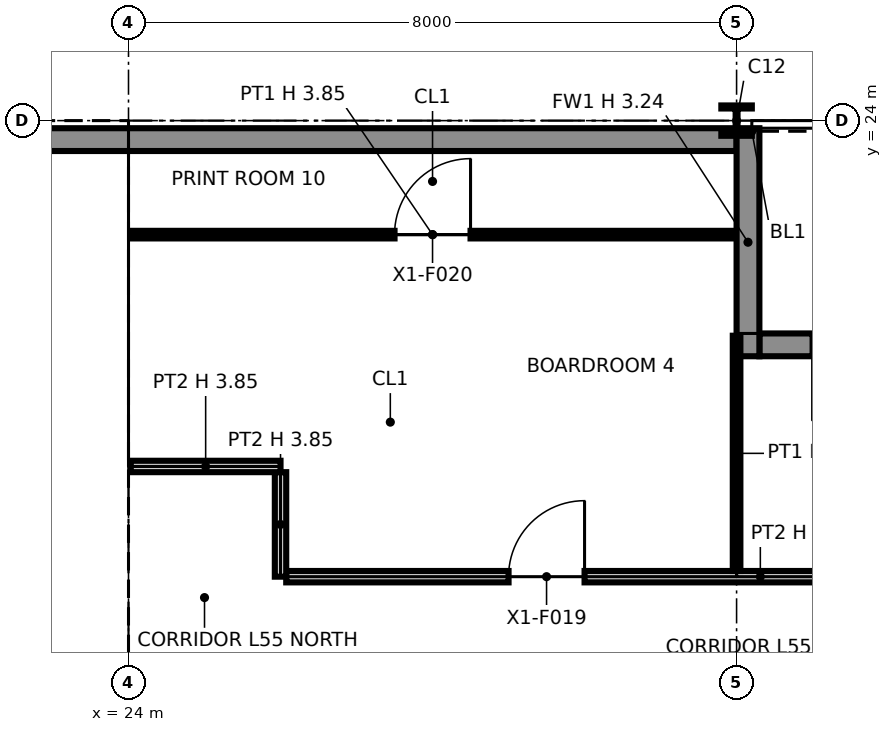
"""IFC4 building model, lengths in metres.
Left out: names, types, materials, properties, quantities, classifications, styles, units other than length and angle.
Written with IfcOpenShell. Run it as: python <this file> out.ifc"""

import sys

from ifc_helpers import new_model, si_unit, direction, frame, frame_2d, origin, origin_2d, place, context, subcontext, project, spatial, polyline, rectangle, i_section, outline, extrude, element, fill, save


model = new_model("IFC4")
c1 = context("Model", 3, precision=1e-05, world=origin(), true_north=direction((0.0, 1.0)))
c2 = subcontext(c1, "Body", "Model", "MODEL_VIEW")
j1 = project(units=[si_unit("LENGTHUNIT", "METRE"), si_unit("PLANEANGLEUNIT", "RADIAN")], contexts=[c1])
p1 = place(None, origin())
s1 = spatial("IfcSite", under=j1, at=p1, CompositionType="ELEMENT")
p2 = place(p1, origin())
s2 = spatial("IfcBuilding", under=s1, at=p2, CompositionType="ELEMENT")
p3 = place(p2, frame((0.0, 0.0, 255.0)))
s3 = spatial("IfcBuildingStorey", under=s2, at=p3, CompositionType="ELEMENT", Elevation=255.0)
for number, where, z_axis, x_axis in (
    (1, (24.0, 24.0, 0.0), (0.0, 0.0, 1.0), (1.0, 0.0, 0.0)),
    (2, (32.0, 24.0, 0.0), (0.0, 0.0, 1.0), (1.0, 0.0, 0.0)),
):
    element("IfcColumn", number, at=place(p3, frame(where, z_axis=z_axis, x_axis=x_axis)), inside=s3, PredefinedType="COLUMN", context=c2, shape_type="SweptSolid", body=[
        extrude(i_section(OverallWidth=0.401, OverallDepth=0.399, WebThickness=0.025, FlangeThickness=0.04, at=origin_2d()), origin(), (0.0, 0.0, 1.0), 3.85),
    ])
p4 = place(p3, frame((39.7, 21.05, 0.0), z_axis=(0.0, 0.0, 1.0), x_axis=(-1.0, 0.0, 0.0)))
e3 = element("IfcWall", 3, at=p4, inside=s3, PredefinedType="SOLIDWALL", context=c2, shape_type="SweptSolid", body=[
    extrude(rectangle(XDim=7.4, YDim=0.3, at=frame_2d((3.7, 0.0))), origin(), (0.0, 0.0, 1.0), 3.85),
])
p5 = place(p4, frame((0.3, 0.0, 0.9)))
e4 = element("IfcOpeningElement", 4, at=p5, cuts=e3, PredefinedType="OPENING", context=c2, shape_type="SweptSolid", body=[
    extrude(rectangle(XDim=2.8, YDim=2.2, at=frame_2d((1.4, 1.1))), frame((0.0, 0.16, 0.0), z_axis=(0.0, -1.0, 0.0), x_axis=(1.0, 0.0, 0.0)), (0.0, 0.0, 1.0), 0.32),
])
p6 = place(p4, frame((4.7, 0.0, 0.0)))
e5 = element("IfcOpeningElement", 5, at=p6, cuts=e3, PredefinedType="OPENING", context=c2, shape_type="SweptSolid", body=[
    extrude(rectangle(XDim=2.0, YDim=2.4, at=frame_2d((1.0, 1.2))), frame((0.0, 0.16, 0.0), z_axis=(0.0, -1.0, 0.0), x_axis=(1.0, 0.0, 0.0)), (0.0, 0.0, 1.0), 0.32),
])
p7 = place(p3, frame((32.15, 23.9, 0.0), z_axis=(0.0, 0.0, 1.0), x_axis=(0.0, -1.0, 0.0)))
e6 = element("IfcWall", 6, at=p7, inside=s3, PredefinedType="SOLIDWALL", context=c2, shape_type="SweptSolid", body=[
    extrude(rectangle(XDim=3.0, YDim=0.3, at=frame_2d((1.5, 0.0))), origin(), (0.0, 0.0, 1.0), 3.237),
])
p8 = place(p3, frame((32.0, 23.75, 0.0), z_axis=(0.0, 0.0, 1.0), x_axis=(-1.0, 0.0, 0.0)))
e7 = element("IfcWall", 7, at=p8, inside=s3, PredefinedType="SOLIDWALL", context=c2, shape_type="SweptSolid", body=[
    extrude(rectangle(XDim=25.9, YDim=0.3, at=frame_2d((12.95, 0.0))), origin(), (0.0, 0.0, 1.0), 3.85),
])
p9 = place(p3, frame((8.65, 23.25, 0.0), z_axis=(0.0, 0.0, 1.0), x_axis=(1.0, 0.0, 0.0)))
e8 = element("IfcWall", 8, at=p9, inside=s3, PredefinedType="PARTITIONING", context=c2, shape_type="SweptSolid", body=[
    extrude(outline(polyline([(0.0, 0.0), (14.7, 0.0), (14.7, 3.85), (7.438, 3.85), (7.438, 3.308), (7.262, 3.308), (7.261, 3.85), (0.0, 3.85), (0.0, 0.0)])), frame((0.0, 0.1, 0.0), z_axis=(0.0, -1.0, 0.0), x_axis=(1.0, 0.0, 0.0)), (0.0, 0.0, 1.0), 0.2),
])
p10 = place(p3, frame((8.85, 19.9, 0.0), z_axis=(0.0, 0.0, 1.0), x_axis=(1.0, 0.0, 0.0)))
e9 = element("IfcWall", 9, at=p10, inside=s3, PredefinedType="PARTITIONING", context=c2, shape_type="SweptSolid", body=[
    extrude(outline(polyline([(0.0, 0.0), (14.3, 0.0), (14.3, 3.85), (7.239, 3.85), (7.238, 3.308), (7.062, 3.308), (7.062, 3.85), (0.0, 3.85), (0.0, 0.0)])), frame((0.0, 0.1, 0.0), z_axis=(0.0, -1.0, 0.0), x_axis=(1.0, 0.0, 0.0)), (0.0, 0.0, 1.0), 0.2),
])
p11 = place(p10, frame((2.125, 0.0, 0.0)))
e10 = element("IfcOpeningElement", 10, at=p11, cuts=e9, PredefinedType="OPENING", context=c2, shape_type="SweptSolid", body=[
    extrude(rectangle(XDim=0.9, YDim=2.1, at=frame_2d((0.45, 1.05))), frame((0.0, 0.11, 0.0), z_axis=(0.0, -1.0, 0.0), x_axis=(1.0, 0.0, 0.0)), (0.0, 0.0, 1.0), 0.22),
])
p12 = place(p10, frame((5.65, 0.0, 0.0)))
e11 = element("IfcOpeningElement", 11, at=p12, cuts=e9, PredefinedType="OPENING", context=c2, shape_type="SweptSolid", body=[
    extrude(rectangle(XDim=1.1, YDim=2.1, at=frame_2d((0.55, 1.05))), frame((0.0, 0.11, 0.0), z_axis=(0.0, -1.0, 0.0), x_axis=(1.0, 0.0, 0.0)), (0.0, 0.0, 1.0), 0.22),
])
p13 = place(p10, frame((7.95, 0.0, 0.0)))
e12 = element("IfcOpeningElement", 12, at=p13, cuts=e9, PredefinedType="OPENING", context=c2, shape_type="SweptSolid", body=[
    extrude(rectangle(XDim=1.1, YDim=2.1, at=frame_2d((0.55, 1.05))), frame((0.0, 0.11, 0.0), z_axis=(0.0, -1.0, 0.0), x_axis=(1.0, 0.0, 0.0)), (0.0, 0.0, 1.0), 0.22),
])
p14 = place(p10, frame((10.25, 0.0, 0.0)))
e13 = element("IfcOpeningElement", 13, at=p14, cuts=e9, PredefinedType="OPENING", context=c2, shape_type="SweptSolid", body=[
    extrude(rectangle(XDim=1.1, YDim=2.1, at=frame_2d((0.55, 1.05))), frame((0.0, 0.11, 0.0), z_axis=(0.0, -1.0, 0.0), x_axis=(1.0, 0.0, 0.0)), (0.0, 0.0, 1.0), 0.22),
])
p15 = place(p10, frame((12.625, 0.0, 0.0)))
e14 = element("IfcOpeningElement", 14, at=p15, cuts=e9, PredefinedType="OPENING", context=c2, shape_type="SweptSolid", body=[
    extrude(rectangle(XDim=1.1, YDim=2.1, at=frame_2d((0.55, 1.05))), frame((0.0, 0.11, 0.0), z_axis=(0.0, -1.0, 0.0), x_axis=(1.0, 0.0, 0.0)), (0.0, 0.0, 1.0), 0.22),
])
p16 = place(p3, frame((23.25, 8.85, 0.0), z_axis=(0.0, 0.0, 1.0), x_axis=(0.0, 1.0, 0.0)))
e15 = element("IfcWall", 15, at=p16, inside=s3, PredefinedType="PARTITIONING", context=c2, shape_type="SweptSolid", body=[
    extrude(outline(polyline([(0.0, 0.0), (14.3, 0.0), (14.3, 3.85), (10.225, 3.85), (10.224, 3.44), (10.076, 3.44), (10.075, 3.85), (7.239, 3.85), (7.238, 3.308), (7.062, 3.308), (7.062, 3.85), (5.225, 3.85), (5.224, 3.44), (5.076, 3.44), (5.075, 3.85), (0.0, 3.85), (0.0, 0.0)])), frame((0.0, 0.1, 0.0), z_axis=(0.0, -1.0, 0.0), x_axis=(1.0, 0.0, 0.0)), (0.0, 0.0, 1.0), 0.2),
])
p17 = place(p16, frame((8.3, 0.0, 0.0)))
e16 = element("IfcOpeningElement", 16, at=p17, cuts=e15, PredefinedType="OPENING", context=c2, shape_type="SweptSolid", body=[
    extrude(rectangle(XDim=1.8, YDim=2.1, at=frame_2d((0.9, 1.05))), frame((0.0, 0.11, 0.0), z_axis=(0.0, -1.0, 0.0), x_axis=(1.0, 0.0, 0.0)), (0.0, 0.0, 1.0), 0.22),
])
p18 = place(p3, frame((26.075, 18.0, 0.0), z_axis=(0.0, 0.0, 1.0), x_axis=(1.0, 0.0, 0.0)))
e17 = element("IfcWall", 17, at=p18, inside=s3, PredefinedType="PARTITIONING", context=c2, shape_type="SweptSolid", body=[
    extrude(rectangle(XDim=12.475, YDim=0.15, at=frame_2d((6.238, 0.0))), origin(), (0.0, 0.0, 1.0), 3.85),
])
p19 = place(p18, frame((8.7, 0.0, 0.0)))
e18 = element("IfcOpeningElement", 18, at=p19, cuts=e17, PredefinedType="OPENING", context=c2, shape_type="SweptSolid", body=[
    extrude(rectangle(XDim=1.0, YDim=2.1, at=frame_2d((0.5, 1.05))), frame((0.0, 0.085, 0.0), z_axis=(0.0, -1.0, 0.0), x_axis=(1.0, 0.0, 0.0)), (0.0, 0.0, 1.0), 0.17),
])
p20 = place(p18, frame((2.925, 0.0, 0.0)))
e19 = element("IfcOpeningElement", 19, at=p20, cuts=e17, PredefinedType="OPENING", context=c2, shape_type="SweptSolid", body=[
    extrude(rectangle(XDim=1.0, YDim=2.1, at=frame_2d((0.5, 1.05))), frame((0.0, 0.085, 0.0), z_axis=(0.0, -1.0, 0.0), x_axis=(1.0, 0.0, 0.0)), (0.0, 0.0, 1.0), 0.17),
])
p21 = place(p3, frame((26.0, 18.0, 0.0), z_axis=(0.0, 0.0, 1.0), x_axis=(0.0, 1.0, 0.0)))
e20 = element("IfcWall", 20, at=p21, inside=s3, PredefinedType="PARTITIONING", context=c2, shape_type="SweptSolid", body=[
    extrude(rectangle(XDim=1.375, YDim=0.15, at=frame_2d((0.688, 0.0))), origin(), (0.0, 0.0, 1.0), 3.85),
])
p22 = place(p3, frame((32.0, 18.075, 0.0), z_axis=(0.0, 0.0, 1.0), x_axis=(0.0, 1.0, 0.0)))
e21 = element("IfcWall", 21, at=p22, inside=s3, PredefinedType="PARTITIONING", context=c2, shape_type="SweptSolid", body=[
    extrude(rectangle(XDim=3.095, YDim=0.1, at=frame_2d((1.547, 0.0))), origin(), (0.0, 0.0, 1.0), 3.172),
])
p23 = place(p3, frame((24.03, 19.45, 0.0), z_axis=(0.0, 0.0, 1.0), x_axis=(1.0, 0.0, 0.0)))
e22 = element("IfcWall", 22, at=p23, inside=s3, PredefinedType="PARTITIONING", context=c2, shape_type="SweptSolid", body=[
    extrude(rectangle(XDim=1.97, YDim=0.15, at=frame_2d((0.985, 0.0))), origin(), (0.0, 0.0, 1.0), 3.85),
])
p24 = place(p3, frame((24.03, 22.5, 0.0), z_axis=(0.0, 0.0, 1.0), x_axis=(1.0, 0.0, 0.0)))
e23 = element("IfcWall", 23, at=p24, inside=s3, PredefinedType="PARTITIONING", context=c2, shape_type="SweptSolid", body=[
    extrude(rectangle(XDim=7.94, YDim=0.1, at=frame_2d((3.97, 0.0))), origin(), (0.0, 0.0, 1.0), 3.85),
])
p25 = place(p24, frame((3.47, 0.0, 0.0)))
e24 = element("IfcOpeningElement", 24, at=p25, cuts=e23, PredefinedType="OPENING", context=c2, shape_type="SweptSolid", body=[
    extrude(rectangle(XDim=1.0, YDim=2.1, at=frame_2d((0.5, 1.05))), frame((0.0, 0.06, 0.0), z_axis=(0.0, -1.0, 0.0), x_axis=(1.0, 0.0, 0.0)), (0.0, 0.0, 1.0), 0.12),
])
p26 = place(p17, origin())
e25 = element("IfcDoor", 25, at=p26, inside=s3, OperationType="DOUBLE_DOOR_SINGLE_SWING", PredefinedType="NOTDEFINED", context=c2, shape_type="SweptSolid", body=[
    extrude(rectangle(XDim=1.8, YDim=2.1, at=frame_2d((0.9, 1.05))), frame((0.0, 0.025, 0.0), z_axis=(0.0, -1.0, 0.0), x_axis=(1.0, 0.0, 0.0)), (0.0, 0.0, 1.0), 0.05),
])
fill(e16, e25)
p27 = place(p20, origin())
e26 = element("IfcDoor", 26, at=p27, inside=s3, OperationType="SINGLE_SWING_RIGHT", PredefinedType="DOOR", context=c2, shape_type="SweptSolid", body=[
    extrude(rectangle(XDim=1.0, YDim=2.1, at=frame_2d((0.5, 1.05))), frame((0.0, 0.025, 0.0), z_axis=(0.0, -1.0, 0.0), x_axis=(1.0, 0.0, 0.0)), (0.0, 0.0, 1.0), 0.05),
])
fill(e19, e26)
p28 = place(p25, origin())
e27 = element("IfcDoor", 27, at=p28, inside=s3, OperationType="SINGLE_SWING_RIGHT", PredefinedType="DOOR", context=c2, shape_type="SweptSolid", body=[
    extrude(rectangle(XDim=1.0, YDim=2.1, at=frame_2d((0.5, 1.05))), frame((0.0, 0.025, 0.0), z_axis=(0.0, -1.0, 0.0), x_axis=(1.0, 0.0, 0.0)), (0.0, 0.0, 1.0), 0.05),
])
fill(e24, e27)
save(model, sys.argv[1])
